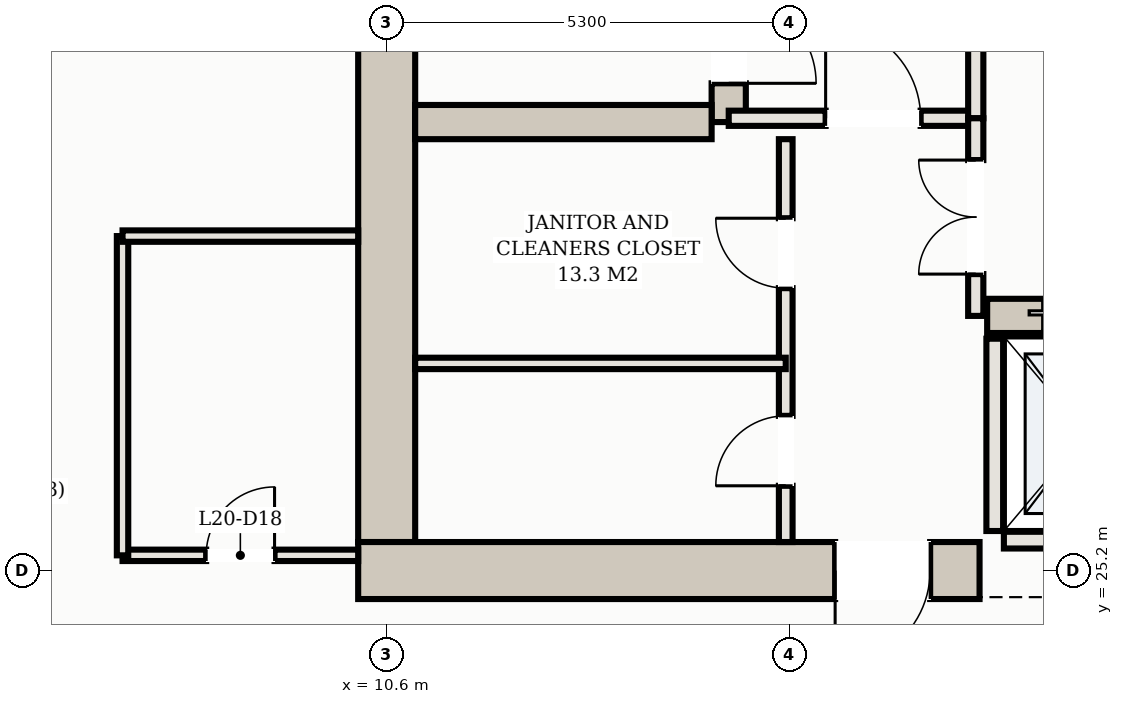
"""IFC4 building model, lengths in metres.
Left out: names, types, materials, properties, quantities, classifications, styles, units other than length and angle.
Written with IfcOpenShell. Run it as: python <this file> out.ifc"""

import sys

from ifc_helpers import new_model, si_unit, direction, frame, frame_2d, origin, place, context, subcontext, project, spatial, rectangle, extrude, element, fill, save


model = new_model("IFC4")
c1 = context("Model", 3, precision=1e-05, world=origin(), true_north=direction((0.0, 1.0)))
c2 = subcontext(c1, "Body", "Model", "MODEL_VIEW")
j1 = project(units=[si_unit("LENGTHUNIT", "METRE"), si_unit("PLANEANGLEUNIT", "RADIAN")], contexts=[c1])
p1 = place(None, origin())
s1 = spatial("IfcSite", under=j1, at=p1, CompositionType="ELEMENT")
p2 = place(p1, origin())
s2 = spatial("IfcBuilding", under=s1, at=p2, CompositionType="ELEMENT")
p3 = place(p2, frame((0.0, 0.0, 77.2)))
s3 = spatial("IfcBuildingStorey", under=s2, at=p3, CompositionType="ELEMENT", Elevation=77.2)
p4 = place(p3, frame((10.6, 25.575, 0.0), z_axis=(0.0, 0.0, 1.0), x_axis=(0.0, 1.0, 0.0)))
e1 = element("IfcWall", 1, at=p4, inside=s3, PredefinedType="SHEAR", context=c2, shape_type="SweptSolid", body=[
    extrude(rectangle(XDim=14.05, YDim=0.75, at=frame_2d((7.025, 0.0))), origin(), (0.0, 0.0, 1.0), 4.29),
])
p5 = place(p3, frame((10.225, 25.2, 0.0), z_axis=(0.0, 0.0, 1.0), x_axis=(1.0, 0.0, 0.0)))
e2 = element("IfcWall", 2, at=p5, inside=s3, PredefinedType="SHEAR", context=c2, shape_type="SweptSolid", body=[
    extrude(rectangle(XDim=8.175, YDim=0.75, at=frame_2d((4.087, 0.0))), origin(), (0.0, 0.0, 1.0), 4.29),
])
p6 = place(p5, frame((6.275, 0.0, 0.0)))
e3 = element("IfcOpeningElement", 3, at=p6, cuts=e2, PredefinedType="OPENING", context=c2, shape_type="SweptSolid", body=[
    extrude(rectangle(XDim=1.25, YDim=2.2, at=frame_2d((0.625, 1.1))), frame((0.0, 0.385, 0.0), z_axis=(0.0, -1.0, 0.0), x_axis=(1.0, 0.0, 0.0)), (0.0, 0.0, 1.0), 0.77),
])
p7 = place(p3, frame((15.1, 31.1, 0.0), z_axis=(0.0, 0.0, 1.0), x_axis=(0.0, 1.0, 0.0)))
e4 = element("IfcWall", 4, at=p7, inside=s3, PredefinedType="SHEAR", context=c2, shape_type="SweptSolid", body=[
    extrude(rectangle(XDim=8.525, YDim=0.45, at=frame_2d((4.262, 0.0))), origin(), (0.0, 0.0, 1.0), 4.29),
])
p8 = place(p7, frame((0.51, 0.0, 0.0)))
e5 = element("IfcOpeningElement", 5, at=p8, cuts=e4, PredefinedType="OPENING", context=c2, shape_type="SweptSolid", body=[
    extrude(rectangle(XDim=1.15, YDim=2.2, at=frame_2d((0.575, 1.1))), frame((0.0, 0.235, 0.0), z_axis=(0.0, -1.0, 0.0), x_axis=(1.0, 0.0, 0.0)), (0.0, 0.0, 1.0), 0.47),
])
p9 = place(p3, frame((10.975, 31.1, 0.0), z_axis=(0.0, 0.0, 1.0), x_axis=(1.0, 0.0, 0.0)))
e6 = element("IfcWall", 6, at=p9, inside=s3, PredefinedType="SHEAR", context=c2, shape_type="SweptSolid", body=[
    extrude(rectangle(XDim=3.9, YDim=0.45, at=frame_2d((1.95, 0.0))), origin(), (0.0, 0.0, 1.0), 4.29),
])
p10 = place(p3, frame((18.5, 28.55, 0.0), z_axis=(0.0, 0.0, 1.0), x_axis=(1.0, 0.0, 0.0)))
e7 = element("IfcWall", 7, at=p10, inside=s3, PredefinedType="SHEAR", context=c2, shape_type="SweptSolid", body=[
    extrude(rectangle(XDim=16.0, YDim=0.45, at=frame_2d((8.0, 0.0))), origin(), (0.0, 0.0, 1.0), 4.29),
])
p11 = place(p10, frame((0.75, 0.0, 0.0)))
e8 = element("IfcOpeningElement", 8, at=p11, cuts=e7, PredefinedType="OPENING", context=c2, shape_type="SweptSolid", body=[
    extrude(rectangle(XDim=1.1, YDim=2.15, at=frame_2d((0.55, 1.075))), frame((0.0, 0.235, 0.0), z_axis=(0.0, -1.0, 0.0), x_axis=(1.0, 0.0, 0.0)), (0.0, 0.0, 1.0), 0.47),
])
p12 = place(p10, frame((3.35, 0.0, 0.0)))
e9 = element("IfcOpeningElement", 9, at=p12, cuts=e7, PredefinedType="OPENING", context=c2, shape_type="SweptSolid", body=[
    extrude(rectangle(XDim=1.1, YDim=2.15, at=frame_2d((0.55, 1.075))), frame((0.0, 0.235, 0.0), z_axis=(0.0, -1.0, 0.0), x_axis=(1.0, 0.0, 0.0)), (0.0, 0.0, 1.0), 0.47),
])
p13 = place(p10, frame((5.95, 0.0, 0.0)))
e10 = element("IfcOpeningElement", 10, at=p13, cuts=e7, PredefinedType="OPENING", context=c2, shape_type="SweptSolid", body=[
    extrude(rectangle(XDim=1.1, YDim=2.15, at=frame_2d((0.55, 1.075))), frame((0.0, 0.235, 0.0), z_axis=(0.0, -1.0, 0.0), x_axis=(1.0, 0.0, 0.0)), (0.0, 0.0, 1.0), 0.47),
])
p14 = place(p10, frame((8.95, 0.0, 0.0)))
e11 = element("IfcOpeningElement", 11, at=p14, cuts=e7, PredefinedType="OPENING", context=c2, shape_type="SweptSolid", body=[
    extrude(rectangle(XDim=1.1, YDim=2.15, at=frame_2d((0.55, 1.075))), frame((0.0, 0.235, 0.0), z_axis=(0.0, -1.0, 0.0), x_axis=(1.0, 0.0, 0.0)), (0.0, 0.0, 1.0), 0.47),
])
p15 = place(p10, frame((11.55, 0.0, 0.0)))
e12 = element("IfcOpeningElement", 12, at=p15, cuts=e7, PredefinedType="OPENING", context=c2, shape_type="SweptSolid", body=[
    extrude(rectangle(XDim=1.1, YDim=2.15, at=frame_2d((0.55, 1.075))), frame((0.0, 0.235, 0.0), z_axis=(0.0, -1.0, 0.0), x_axis=(1.0, 0.0, 0.0)), (0.0, 0.0, 1.0), 0.47),
])
p16 = place(p10, frame((14.15, 0.0, 0.0)))
e13 = element("IfcOpeningElement", 13, at=p16, cuts=e7, PredefinedType="OPENING", context=c2, shape_type="SweptSolid", body=[
    extrude(rectangle(XDim=1.1, YDim=2.15, at=frame_2d((0.55, 1.075))), frame((0.0, 0.235, 0.0), z_axis=(0.0, -1.0, 0.0), x_axis=(1.0, 0.0, 0.0)), (0.0, 0.0, 1.0), 0.47),
])
p17 = place(p3, frame((18.6, 25.72, 0.0), z_axis=(0.0, 0.0, 1.0), x_axis=(0.0, 1.0, 0.0)))
e14 = element("IfcWall", 14, at=p17, inside=s3, PredefinedType="SOLIDWALL", context=c2, shape_type="SweptSolid", body=[
    extrude(rectangle(XDim=2.53, YDim=0.22, at=frame_2d((1.265, 0.0))), origin(), (0.0, 0.0, 1.0), 4.29),
])
p18 = place(p3, frame((18.72, 25.6, 0.0), z_axis=(0.0, 0.0, 1.0), x_axis=(1.0, 0.0, 0.0)))
e15 = element("IfcWall", 15, at=p18, inside=s3, PredefinedType="SOLIDWALL", context=c2, shape_type="SweptSolid", body=[
    extrude(rectangle(XDim=2.16, YDim=0.22, at=frame_2d((1.08, 0.0))), origin(), (0.0, 0.0, 1.0), 4.29),
])
p19 = place(p3, frame((15.1, 31.15, 0.0), z_axis=(0.0, 0.0, 1.0), x_axis=(1.0, 0.0, 0.0)))
e16 = element("IfcWall", 16, at=p19, inside=s3, PredefinedType="PARTITIONING", context=c2, shape_type="SweptSolid", body=[
    extrude(rectangle(XDim=3.25, YDim=0.2, at=frame_2d((1.625, 0.0))), origin(), (0.0, 0.0, 1.0), 4.29),
])
p20 = place(p19, frame((1.275, 0.0, 0.0)))
e17 = element("IfcOpeningElement", 17, at=p20, cuts=e16, PredefinedType="OPENING", context=c2, shape_type="SweptSolid", body=[
    extrude(rectangle(XDim=1.25, YDim=2.2, at=frame_2d((0.625, 1.1))), frame((0.0, 0.11, 0.0), z_axis=(0.0, -1.0, 0.0), x_axis=(1.0, 0.0, 0.0)), (0.0, 0.0, 1.0), 0.22),
])
p21 = place(p3, frame((18.35, 31.15, 0.0), z_axis=(0.0, 0.0, 1.0), x_axis=(0.0, 1.0, 0.0)))
e18 = element("IfcWall", 18, at=p21, inside=s3, PredefinedType="PARTITIONING", context=c2, shape_type="SweptSolid", body=[
    extrude(rectangle(XDim=5.15, YDim=0.2, at=frame_2d((2.575, 0.0))), origin(), (0.0, 0.0, 1.0), 4.29),
])
p22 = place(p21, frame((1.875, 0.0, 0.0)))
e19 = element("IfcOpeningElement", 19, at=p22, cuts=e18, PredefinedType="OPENING", context=c2, shape_type="SweptSolid", body=[
    extrude(rectangle(XDim=1.25, YDim=2.2, at=frame_2d((0.625, 1.1))), frame((0.0, 0.11, 0.0), z_axis=(0.0, -1.0, 0.0), x_axis=(1.0, 0.0, 0.0)), (0.0, 0.0, 1.0), 0.22),
])
p23 = place(p3, frame((15.85, 25.575, 0.0), z_axis=(0.0, 0.0, 1.0), x_axis=(0.0, 1.0, 0.0)))
e20 = element("IfcWall", 20, at=p23, inside=s3, PredefinedType="PARTITIONING", context=c2, shape_type="SweptSolid", body=[
    extrude(rectangle(XDim=5.3, YDim=0.18, at=frame_2d((2.65, 0.0))), origin(), (0.0, 0.0, 1.0), 4.29),
])
p24 = place(p23, frame((0.74, 0.0, 0.0)))
e21 = element("IfcOpeningElement", 21, at=p24, cuts=e20, PredefinedType="OPENING", context=c2, shape_type="SweptSolid", body=[
    extrude(rectangle(XDim=0.92, YDim=2.15, at=frame_2d((0.46, 1.075))), frame((0.0, 0.1, 0.0), z_axis=(0.0, -1.0, 0.0), x_axis=(1.0, 0.0, 0.0)), (0.0, 0.0, 1.0), 0.2),
])
p25 = place(p23, frame((3.34, 0.0, 0.0)))
e22 = element("IfcOpeningElement", 22, at=p25, cuts=e20, PredefinedType="OPENING", context=c2, shape_type="SweptSolid", body=[
    extrude(rectangle(XDim=0.92, YDim=2.15, at=frame_2d((0.46, 1.075))), frame((0.0, 0.1, 0.0), z_axis=(0.0, -1.0, 0.0), x_axis=(1.0, 0.0, 0.0)), (0.0, 0.0, 1.0), 0.2),
])
p26 = place(p3, frame((10.975, 27.925, 0.0), z_axis=(0.0, 0.0, 1.0), x_axis=(1.0, 0.0, 0.0)))
e23 = element("IfcWall", 23, at=p26, inside=s3, PredefinedType="PARTITIONING", context=c2, shape_type="SweptSolid", body=[
    extrude(rectangle(XDim=4.875, YDim=0.15, at=frame_2d((2.438, 0.0))), origin(), (0.0, 0.0, 1.0), 4.29),
])
p27 = place(p3, frame((18.35, 28.55, 0.0), z_axis=(0.0, 0.0, 1.0), x_axis=(0.0, 1.0, 0.0)))
e24 = element("IfcWall", 24, at=p27, inside=s3, PredefinedType="PARTITIONING", context=c2, shape_type="SweptSolid", body=[
    extrude(rectangle(XDim=2.6, YDim=0.2, at=frame_2d((1.3, 0.0))), origin(), (0.0, 0.0, 1.0), 4.29),
])
p28 = place(p27, frame((0.55, 0.0, 0.0)))
e25 = element("IfcOpeningElement", 25, at=p28, cuts=e24, PredefinedType="OPENING", context=c2, shape_type="SweptSolid", body=[
    extrude(rectangle(XDim=1.5, YDim=2.25, at=frame_2d((0.75, 1.125))), frame((0.0, 0.11, 0.0), z_axis=(0.0, -1.0, 0.0), x_axis=(1.0, 0.0, 0.0)), (0.0, 0.0, 1.0), 0.22),
])
p29 = place(p3, frame((7.125, 25.4, 0.0), z_axis=(0.0, 0.0, 1.0), x_axis=(1.0, 0.0, 0.0)))
e26 = element("IfcWall", 26, at=p29, inside=s3, PredefinedType="PARTITIONING", context=c2, shape_type="SweptSolid", body=[
    extrude(rectangle(XDim=3.1, YDim=0.15, at=frame_2d((1.55, 0.0))), origin(), (0.0, 0.0, 1.0), 3.535),
])
p30 = place(p29, frame((1.1, 0.0, 0.0)))
e27 = element("IfcOpeningElement", 27, at=p30, cuts=e26, PredefinedType="OPENING", context=c2, shape_type="SweptSolid", body=[
    extrude(rectangle(XDim=0.9, YDim=2.15, at=frame_2d((0.45, 1.075))), frame((0.0, 0.085, 0.0), z_axis=(0.0, -1.0, 0.0), x_axis=(1.0, 0.0, 0.0)), (0.0, 0.0, 1.0), 0.17),
])
p31 = place(p3, frame((7.125, 25.4, 0.0), z_axis=(0.0, 0.0, 1.0), x_axis=(0.0, 1.0, 0.0)))
e28 = element("IfcWall", 28, at=p31, inside=s3, PredefinedType="PARTITIONING", context=c2, shape_type="SweptSolid", body=[
    extrude(rectangle(XDim=4.2, YDim=0.15, at=frame_2d((2.1, 0.0))), origin(), (0.0, 0.0, 1.0), 4.29),
])
p32 = place(p3, frame((7.125, 29.6, 0.0), z_axis=(0.0, 0.0, 1.0), x_axis=(1.0, 0.0, 0.0)))
e29 = element("IfcWall", 29, at=p32, inside=s3, PredefinedType="PARTITIONING", context=c2, shape_type="SweptSolid", body=[
    extrude(rectangle(XDim=3.1, YDim=0.15, at=frame_2d((1.55, 0.0))), origin(), (0.0, 0.0, 1.0), 4.29),
])
p33 = place(p6, frame((1.25, 0.0, 0.0), z_axis=(0.0, 0.0, 1.0), x_axis=(-1.0, 0.0, 0.0)))
e30 = element("IfcDoor", 30, at=p33, inside=s3, OperationType="SINGLE_SWING_RIGHT", PredefinedType="DOOR", context=c2, shape_type="SweptSolid", body=[
    extrude(rectangle(XDim=1.25, YDim=2.2, at=frame_2d((0.625, 1.1))), frame((0.0, 0.025, 0.0), z_axis=(0.0, -1.0, 0.0), x_axis=(1.0, 0.0, 0.0)), (0.0, 0.0, 1.0), 0.05),
])
fill(e3, e30)
p34 = place(p20, origin())
e31 = element("IfcDoor", 31, at=p34, inside=s3, OperationType="SINGLE_SWING_LEFT", PredefinedType="DOOR", context=c2, shape_type="SweptSolid", body=[
    extrude(rectangle(XDim=1.25, YDim=2.2, at=frame_2d((0.625, 1.1))), frame((0.0, 0.025, 0.0), z_axis=(0.0, -1.0, 0.0), x_axis=(1.0, 0.0, 0.0)), (0.0, 0.0, 1.0), 0.05),
])
fill(e17, e31)
p35 = place(p8, frame((1.15, 0.0, 0.0), z_axis=(0.0, 0.0, 1.0), x_axis=(-1.0, 0.0, 0.0)))
e32 = element("IfcDoor", 32, at=p35, inside=s3, OperationType="SINGLE_SWING_RIGHT", PredefinedType="DOOR", context=c2, shape_type="SweptSolid", body=[
    extrude(rectangle(XDim=1.15, YDim=2.2, at=frame_2d((0.575, 1.1))), frame((0.0, 0.025, 0.0), z_axis=(0.0, -1.0, 0.0), x_axis=(1.0, 0.0, 0.0)), (0.0, 0.0, 1.0), 0.05),
])
fill(e5, e32)
p36 = place(p24, origin())
e33 = element("IfcDoor", 33, at=p36, inside=s3, OperationType="SINGLE_SWING_LEFT", PredefinedType="DOOR", context=c2, shape_type="SweptSolid", body=[
    extrude(rectangle(XDim=0.92, YDim=2.15, at=frame_2d((0.46, 1.075))), frame((0.0, 0.025, 0.0), z_axis=(0.0, -1.0, 0.0), x_axis=(1.0, 0.0, 0.0)), (0.0, 0.0, 1.0), 0.05),
])
fill(e21, e33)
p37 = place(p25, origin())
e34 = element("IfcDoor", 34, at=p37, inside=s3, OperationType="SINGLE_SWING_RIGHT", PredefinedType="DOOR", context=c2, shape_type="SweptSolid", body=[
    extrude(rectangle(XDim=0.92, YDim=2.15, at=frame_2d((0.46, 1.075))), frame((0.0, 0.025, 0.0), z_axis=(0.0, -1.0, 0.0), x_axis=(1.0, 0.0, 0.0)), (0.0, 0.0, 1.0), 0.05),
])
fill(e22, e34)
p38 = place(p28, origin())
e35 = element("IfcDoor", 35, at=p38, inside=s3, OperationType="DOUBLE_DOOR_SINGLE_SWING", PredefinedType="DOOR", context=c2, shape_type="SweptSolid", body=[
    extrude(rectangle(XDim=1.5, YDim=2.25, at=frame_2d((0.75, 1.125))), frame((0.0, 0.025, 0.0), z_axis=(0.0, -1.0, 0.0), x_axis=(1.0, 0.0, 0.0)), (0.0, 0.0, 1.0), 0.05),
])
fill(e25, e35)
p39 = place(p30, origin())
e36 = element("IfcDoor", 36, at=p39, inside=s3, OperationType="SINGLE_SWING_RIGHT", PredefinedType="DOOR", context=c2, shape_type="SweptSolid", body=[
    extrude(rectangle(XDim=0.9, YDim=2.15, at=frame_2d((0.45, 1.075))), frame((0.0, 0.025, 0.0), z_axis=(0.0, -1.0, 0.0), x_axis=(1.0, 0.0, 0.0)), (0.0, 0.0, 1.0), 0.05),
])
fill(e27, e36)
save(model, sys.argv[1])
